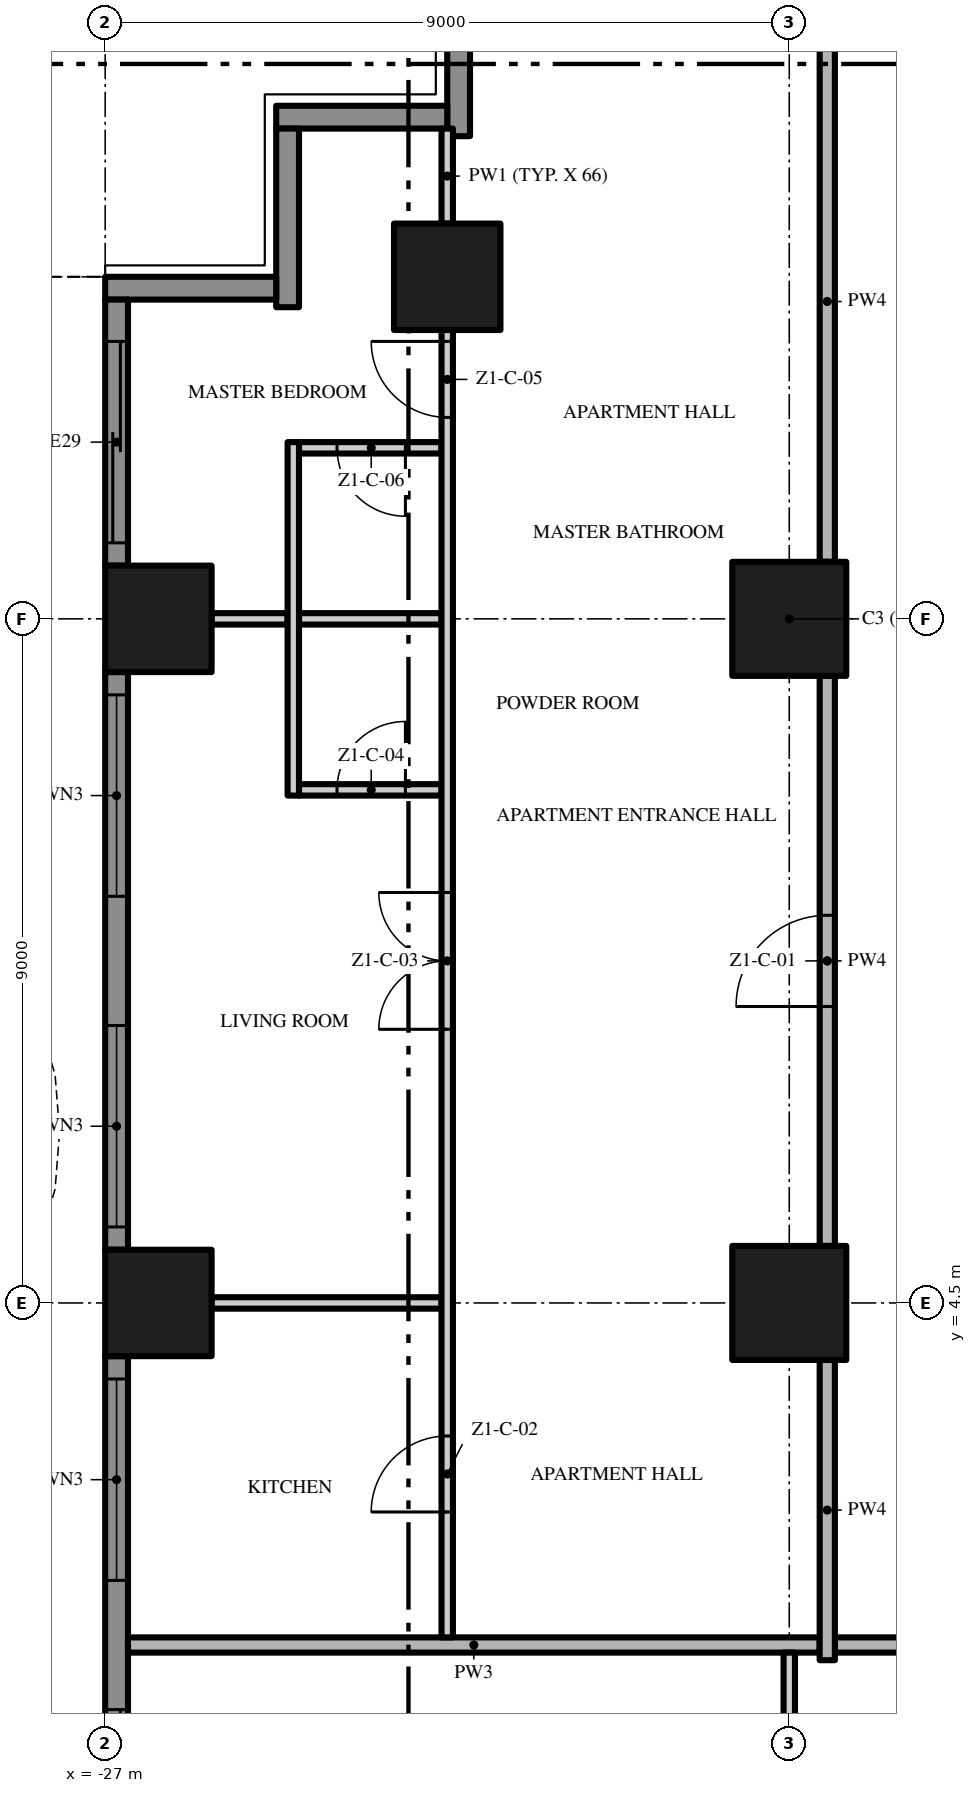
"""IFC4 building model, lengths in metres.
Left out: names, types, materials, properties, quantities, classifications, styles, units other than length and angle.
Written with IfcOpenShell. Run it as: python <this file> out.ifc"""

import sys

from ifc_helpers import new_model, si_unit, direction, frame, frame_2d, origin, origin_2d, place, context, subcontext, project, spatial, polyline, rectangle, outline, extrude, element, fill, save


model = new_model("IFC4")
c1 = context("Model", 3, precision=1e-05, world=origin(), true_north=direction((0.0, 1.0)))
c2 = subcontext(c1, "Body", "Model", "MODEL_VIEW")
j1 = project(units=[si_unit("LENGTHUNIT", "METRE"), si_unit("PLANEANGLEUNIT", "RADIAN")], contexts=[c1])
p1 = place(None, origin())
s1 = spatial("IfcSite", under=j1, at=p1, CompositionType="ELEMENT")
p2 = place(p1, origin())
s2 = spatial("IfcBuilding", under=s1, at=p2, CompositionType="ELEMENT")
p3 = place(p2, frame((0.0, 0.0, 45.4)))
s3 = spatial("IfcBuildingStorey", under=s2, at=p3, CompositionType="ELEMENT", Elevation=45.4)
for number, where, z_axis, x_axis in (
    (1, (-18.0, 13.5, 0.0), (0.0, 0.0, 1.0), (1.0, 0.0, 0.0)),
    (2, (-18.0, 4.5, 0.0), (0.0, 0.0, 1.0), (1.0, 0.0, 0.0)),
):
    element("IfcColumn", number, at=place(p3, frame(where, z_axis=z_axis, x_axis=x_axis)), inside=s3, PredefinedType="COLUMN", context=c2, shape_type="SweptSolid", body=[
        extrude(rectangle(XDim=1.5, YDim=1.5, at=origin_2d()), origin(), (0.0, 0.0, 1.0), 3.5),
    ])
for number, where, z_axis, x_axis in (
    (3, (-26.3, 13.5, 0.0), (0.0, 0.0, 1.0), (1.0, 0.0, 0.0)),
    (4, (-22.5, 18.0, 0.0), (0.0, 0.0, 1.0), (1.0, 0.0, 0.0)),
    (5, (-26.3, 4.5, 0.0), (0.0, 0.0, 1.0), (1.0, 0.0, 0.0)),
):
    element("IfcColumn", number, at=place(p3, frame(where, z_axis=z_axis, x_axis=x_axis)), inside=s3, PredefinedType="COLUMN", context=c2, shape_type="SweptSolid", body=[
        extrude(rectangle(XDim=1.4, YDim=1.4, at=origin_2d()), origin(), (0.0, 0.0, 1.0), 3.5),
    ])
p4 = place(p3, frame((-22.35, 19.85, 0.0), z_axis=(0.0, 0.0, 1.0), x_axis=(0.0, 1.0, 0.0)))
e6 = element("IfcWall", 6, at=p4, inside=s3, PredefinedType="SOLIDWALL", context=c2, shape_type="SweptSolid", body=[
    extrude(rectangle(XDim=2.35, YDim=0.3, at=frame_2d((1.175, 0.0))), origin(), (0.0, 0.0, 1.0), 3.5),
])
p5 = place(p3, frame((-24.75, 20.1, 0.0), z_axis=(0.0, 0.0, 1.0), x_axis=(1.0, 0.0, 0.0)))
e7 = element("IfcWall", 7, at=p5, inside=s3, PredefinedType="SOLIDWALL", context=c2, shape_type="SweptSolid", body=[
    extrude(rectangle(XDim=2.25, YDim=0.3, at=frame_2d((1.125, 0.0))), origin(), (0.0, 0.0, 1.0), 3.5),
])
p6 = place(p3, frame((-24.6, 17.6, 0.0), z_axis=(0.0, 0.0, 1.0), x_axis=(0.0, 1.0, 0.0)))
e8 = element("IfcWall", 8, at=p6, inside=s3, PredefinedType="SOLIDWALL", context=c2, shape_type="SweptSolid", body=[
    extrude(rectangle(XDim=2.35, YDim=0.3, at=frame_2d((1.175, 0.0))), origin(), (0.0, 0.0, 1.0), 3.5),
])
p7 = place(p3, frame((-27.0, 17.85, 0.0), z_axis=(0.0, 0.0, 1.0), x_axis=(1.0, 0.0, 0.0)))
e9 = element("IfcWall", 9, at=p7, inside=s3, PredefinedType="SOLIDWALL", context=c2, shape_type="SweptSolid", body=[
    extrude(rectangle(XDim=2.25, YDim=0.3, at=frame_2d((1.125, 0.0))), origin(), (0.0, 0.0, 1.0), 3.5),
])
p8 = place(p3, frame((-26.85, 14.2, 0.0), z_axis=(0.0, 0.0, 1.0), x_axis=(0.0, 1.0, 0.0)))
e10 = element("IfcWall", 10, at=p8, inside=s3, PredefinedType="SOLIDWALL", context=c2, shape_type="SweptSolid", body=[
    extrude(rectangle(XDim=3.5, YDim=0.3, at=frame_2d((1.75, 0.0))), origin(), (0.0, 0.0, 1.0), 3.5),
])
p9 = place(p8, frame((0.3, 0.0, 0.0)))
e11 = element("IfcOpeningElement", 11, at=p9, cuts=e10, PredefinedType="OPENING", context=c2, shape_type="SweptSolid", body=[
    extrude(rectangle(XDim=2.65, YDim=2.4, at=frame_2d((1.325, 1.2))), frame((0.0, 0.16, 0.0), z_axis=(0.0, -1.0, 0.0), x_axis=(1.0, 0.0, 0.0)), (0.0, 0.0, 1.0), 0.32),
])
p10 = place(p3, frame((-26.85, 5.2, 0.0), z_axis=(0.0, 0.0, 1.0), x_axis=(0.0, 1.0, 0.0)))
e12 = element("IfcWall", 12, at=p10, inside=s3, PredefinedType="SOLIDWALL", context=c2, shape_type="SweptSolid", body=[
    extrude(rectangle(XDim=7.6, YDim=0.3, at=frame_2d((3.8, 0.0))), origin(), (0.0, 0.0, 1.0), 3.5),
])
p11 = place(p10, frame((4.65, 0.0, 0.45)))
e13 = element("IfcOpeningElement", 13, at=p11, cuts=e12, PredefinedType="OPENING", context=c2, shape_type="SweptSolid", body=[
    extrude(rectangle(XDim=2.65, YDim=2.65, at=frame_2d((1.325, 1.325))), frame((0.0, 0.16, 0.0), z_axis=(0.0, -1.0, 0.0), x_axis=(1.0, 0.0, 0.0)), (0.0, 0.0, 1.0), 0.32),
])
p12 = place(p10, frame((0.3, 0.0, 0.45)))
e14 = element("IfcOpeningElement", 14, at=p12, cuts=e12, PredefinedType="OPENING", context=c2, shape_type="SweptSolid", body=[
    extrude(rectangle(XDim=2.65, YDim=2.65, at=frame_2d((1.325, 1.325))), frame((0.0, 0.16, 0.0), z_axis=(0.0, -1.0, 0.0), x_axis=(1.0, 0.0, 0.0)), (0.0, 0.0, 1.0), 0.32),
])
p13 = place(p3, frame((-26.85, -3.8, 0.0), z_axis=(0.0, 0.0, 1.0), x_axis=(0.0, 1.0, 0.0)))
e15 = element("IfcWall", 15, at=p13, inside=s3, PredefinedType="SOLIDWALL", context=c2, shape_type="SweptSolid", body=[
    extrude(rectangle(XDim=7.6, YDim=0.3, at=frame_2d((3.8, 0.0))), origin(), (0.0, 0.0, 1.0), 3.5),
])
p14 = place(p13, frame((4.65, 0.0, 0.45)))
e16 = element("IfcOpeningElement", 16, at=p14, cuts=e15, PredefinedType="OPENING", context=c2, shape_type="SweptSolid", body=[
    extrude(rectangle(XDim=2.65, YDim=2.65, at=frame_2d((1.325, 1.325))), frame((0.0, 0.16, 0.0), z_axis=(0.0, -1.0, 0.0), x_axis=(1.0, 0.0, 0.0)), (0.0, 0.0, 1.0), 0.32),
])
p15 = place(p13, frame((0.3, 0.0, 0.0)))
e17 = element("IfcOpeningElement", 17, at=p15, cuts=e15, PredefinedType="OPENING", context=c2, shape_type="SweptSolid", body=[
    extrude(rectangle(XDim=2.65, YDim=2.4, at=frame_2d((1.325, 1.2))), frame((0.0, 0.16, 0.0), z_axis=(0.0, -1.0, 0.0), x_axis=(1.0, 0.0, 0.0)), (0.0, 0.0, 1.0), 0.32),
])
p16 = place(p3, origin())
e18 = element("IfcWall", 18, at=p16, inside=s3, PredefinedType="USERDEFINED", context=c2, shape_type="SweptSolid", body=[
    extrude(outline(polyline([(-28.8, 18.0), (-29.505, 16.5), (-29.941, 15.0), (-30.0, 14.25), (-29.941, 13.5), (-29.505, 12.0), (-28.8, 10.5), (-28.095, 9.0), (-27.659, 7.5), (-27.6, 6.75), (-27.659, 6.0), (-28.095, 4.5), (-28.8, 3.0), (-29.505, 1.5), (-29.941, 0.0), (-30.0, -0.75), (-29.941, -1.5), (-29.505, -3.0), (-28.8, -4.5), (-28.095, -6.0), (-27.659, -7.5), (-27.6, -8.25), (-27.659, -9.0), (-28.095, -10.5), (-28.8, -12.0), (-29.505, -13.5), (-29.941, -15.0), (-30.0, -15.75), (-29.941, -16.5), (-29.505, -18.0), (-29.265, -17.93), (-29.694, -16.455), (-29.749, -15.75), (-29.694, -15.045), (-29.271, -13.589), (-28.574, -12.106), (-27.86, -10.589), (-27.411, -9.045), (-27.349, -8.25), (-27.411, -7.455), (-27.86, -5.911), (-28.574, -4.394), (-29.271, -2.911), (-29.694, -1.455), (-29.749, -0.75), (-29.694, -0.045), (-29.271, 1.411), (-28.574, 2.894), (-27.86, 4.411), (-27.411, 5.955), (-27.349, 6.75), (-27.411, 7.545), (-27.86, 9.089), (-28.574, 10.606), (-29.271, 12.089), (-29.694, 13.545), (-29.749, 14.25), (-29.694, 14.955), (-29.271, 16.411), (-28.574, 17.894), (-28.8, 18.0)])), origin(), (0.0, 0.0, 1.0), 0.9),
])
p17 = place(p3, frame((-17.4, 0.0, 0.0), z_axis=(0.0, 0.0, 1.0), x_axis=(1.0, 0.0, 0.0)))
e19 = element("IfcWall", 19, at=p17, inside=s3, PredefinedType="PARTITIONING", context=c2, shape_type="SweptSolid", body=[
    extrude(rectangle(XDim=12.8, YDim=0.2, at=frame_2d((6.4, 0.0))), origin(), (0.0, 0.0, 1.0), 3.5),
])
p18 = place(p3, frame((-26.7, 0.0, 0.0), z_axis=(0.0, 0.0, 1.0), x_axis=(1.0, 0.0, 0.0)))
e20 = element("IfcWall", 20, at=p18, inside=s3, PredefinedType="PARTITIONING", context=c2, shape_type="SweptSolid", body=[
    extrude(rectangle(XDim=9.1, YDim=0.2, at=frame_2d((4.55, 0.0))), origin(), (0.0, 0.0, 1.0), 3.5),
])
p19 = place(p3, frame((-25.6, 4.5, 0.0), z_axis=(0.0, 0.0, 1.0), x_axis=(1.0, 0.0, 0.0)))
e21 = element("IfcWall", 21, at=p19, inside=s3, PredefinedType="PARTITIONING", context=c2, shape_type="SweptSolid", body=[
    extrude(rectangle(XDim=3.025, YDim=0.15, at=frame_2d((1.512, 0.0))), origin(), (0.0, 0.0, 1.0), 3.5),
])
p20 = place(p3, frame((-24.45, 11.25, 0.0), z_axis=(0.0, 0.0, 1.0), x_axis=(1.0, 0.0, 0.0)))
e22 = element("IfcWall", 22, at=p20, inside=s3, PredefinedType="PARTITIONING", context=c2, shape_type="SweptSolid", body=[
    extrude(rectangle(XDim=1.875, YDim=0.15, at=frame_2d((0.938, 0.0))), origin(), (0.0, 0.0, 1.0), 3.5),
])
p21 = place(p20, frame((0.5, 0.0, 0.0)))
e23 = element("IfcOpeningElement", 23, at=p21, cuts=e22, PredefinedType="OPENING", context=c2, shape_type="SweptSolid", body=[
    extrude(rectangle(XDim=0.9, YDim=2.1, at=frame_2d((0.45, 1.05))), frame((0.0, 0.085, 0.0), z_axis=(0.0, -1.0, 0.0), x_axis=(1.0, 0.0, 0.0)), (0.0, 0.0, 1.0), 0.17),
])
p22 = place(p3, frame((-25.6, 13.5, 0.0), z_axis=(0.0, 0.0, 1.0), x_axis=(1.0, 0.0, 0.0)))
e24 = element("IfcWall", 24, at=p22, inside=s3, PredefinedType="PARTITIONING", context=c2, shape_type="SweptSolid", body=[
    extrude(rectangle(XDim=1.0, YDim=0.15, at=frame_2d((0.5, 0.0))), origin(), (0.0, 0.0, 1.0), 3.5),
])
p23 = place(p3, frame((-24.45, 13.5, 0.0), z_axis=(0.0, 0.0, 1.0), x_axis=(1.0, 0.0, 0.0)))
e25 = element("IfcWall", 25, at=p23, inside=s3, PredefinedType="PARTITIONING", context=c2, shape_type="SweptSolid", body=[
    extrude(rectangle(XDim=1.875, YDim=0.15, at=frame_2d((0.938, 0.0))), origin(), (0.0, 0.0, 1.0), 3.5),
])
p24 = place(p3, frame((-22.575, 15.75, 0.0), z_axis=(0.0, 0.0, 1.0), x_axis=(-1.0, 0.0, 0.0)))
e26 = element("IfcWall", 26, at=p24, inside=s3, PredefinedType="PARTITIONING", context=c2, shape_type="SweptSolid", body=[
    extrude(rectangle(XDim=1.875, YDim=0.15, at=frame_2d((0.938, 0.0))), origin(), (0.0, 0.0, 1.0), 3.5),
])
p25 = place(p24, frame((0.475, 0.0, 0.0)))
e27 = element("IfcOpeningElement", 27, at=p25, cuts=e26, PredefinedType="OPENING", context=c2, shape_type="SweptSolid", body=[
    extrude(rectangle(XDim=0.9, YDim=2.1, at=frame_2d((0.45, 1.05))), frame((0.0, 0.085, 0.0), z_axis=(0.0, -1.0, 0.0), x_axis=(1.0, 0.0, 0.0)), (0.0, 0.0, 1.0), 0.17),
])
p26 = place(p3, frame((-24.525, 11.175, 0.0), z_axis=(0.0, 0.0, 1.0), x_axis=(0.0, 1.0, 0.0)))
e28 = element("IfcWall", 28, at=p26, inside=s3, PredefinedType="PARTITIONING", context=c2, shape_type="SweptSolid", body=[
    extrude(rectangle(XDim=4.65, YDim=0.15, at=frame_2d((2.325, 0.0))), origin(), (0.0, 0.0, 1.0), 3.5),
])
p27 = place(p3, frame((-22.5, 0.1, 0.0), z_axis=(0.0, 0.0, 1.0), x_axis=(0.0, 1.0, 0.0)))
e29 = element("IfcWall", 29, at=p27, inside=s3, PredefinedType="PARTITIONING", context=c2, shape_type="SweptSolid", body=[
    extrude(rectangle(XDim=17.2, YDim=0.15, at=frame_2d((8.6, 0.0))), origin(), (0.0, 0.0, 1.0), 3.5),
])
p28 = place(p27, frame((1.65, 0.0, 0.0)))
e30 = element("IfcOpeningElement", 30, at=p28, cuts=e29, PredefinedType="OPENING", context=c2, shape_type="SweptSolid", body=[
    extrude(rectangle(XDim=1.0, YDim=2.4, at=frame_2d((0.5, 1.2))), frame((0.0, 0.085, 0.0), z_axis=(0.0, -1.0, 0.0), x_axis=(1.0, 0.0, 0.0)), (0.0, 0.0, 1.0), 0.17),
])
p29 = place(p27, frame((8.0, 0.0, 0.0)))
e31 = element("IfcOpeningElement", 31, at=p29, cuts=e29, PredefinedType="OPENING", context=c2, shape_type="SweptSolid", body=[
    extrude(rectangle(XDim=1.8, YDim=2.4, at=frame_2d((0.9, 1.2))), frame((0.0, 0.085, 0.0), z_axis=(0.0, -1.0, 0.0), x_axis=(1.0, 0.0, 0.0)), (0.0, 0.0, 1.0), 0.17),
])
p30 = place(p27, frame((16.05, 0.0, 0.0)))
e32 = element("IfcOpeningElement", 32, at=p30, cuts=e29, PredefinedType="OPENING", context=c2, shape_type="SweptSolid", body=[
    extrude(rectangle(XDim=1.0, YDim=2.4, at=frame_2d((0.5, 1.2))), frame((0.0, 0.085, 0.0), z_axis=(0.0, -1.0, 0.0), x_axis=(1.0, 0.0, 0.0)), (0.0, 0.0, 1.0), 0.17),
])
p31 = place(p3, frame((-22.5, 18.7, 0.0), z_axis=(0.0, 0.0, 1.0), x_axis=(0.0, 1.0, 0.0)))
e33 = element("IfcWall", 33, at=p31, inside=s3, PredefinedType="PARTITIONING", context=c2, shape_type="SweptSolid", body=[
    extrude(rectangle(XDim=1.25, YDim=0.15, at=frame_2d((0.625, 0.0))), origin(), (0.0, 0.0, 1.0), 3.5),
])
p32 = place(p3, frame((-18.0, -3.75, 0.0), z_axis=(0.0, 0.0, 1.0), x_axis=(0.0, 1.0, 0.0)))
e34 = element("IfcWall", 34, at=p32, inside=s3, PredefinedType="PARTITIONING", context=c2, shape_type="SweptSolid", body=[
    extrude(rectangle(XDim=3.65, YDim=0.15, at=frame_2d((1.825, 0.0))), origin(), (0.0, 0.0, 1.0), 3.5),
])
p33 = place(p32, frame((1.0, 0.0, 0.0)))
e35 = element("IfcOpeningElement", 35, at=p33, cuts=e34, PredefinedType="OPENING", context=c2, shape_type="SweptSolid", body=[
    extrude(rectangle(XDim=1.0, YDim=2.4, at=frame_2d((0.5, 1.2))), frame((0.0, 0.085, 0.0), z_axis=(0.0, -1.0, 0.0), x_axis=(1.0, 0.0, 0.0)), (0.0, 0.0, 1.0), 0.17),
])
p34 = place(p3, frame((-17.5, -0.2, 0.0), z_axis=(0.0, 0.0, 1.0), x_axis=(0.0, 1.0, 0.0)))
e36 = element("IfcWall", 36, at=p34, inside=s3, PredefinedType="PARTITIONING", context=c2, shape_type="SweptSolid", body=[
    extrude(rectangle(XDim=3.95, YDim=0.2, at=frame_2d((1.975, 0.0))), origin(), (0.0, 0.0, 1.0), 3.5),
])
p35 = place(p3, frame((-17.5, 5.25, 0.0), z_axis=(0.0, 0.0, 1.0), x_axis=(0.0, 1.0, 0.0)))
e37 = element("IfcWall", 37, at=p35, inside=s3, PredefinedType="PARTITIONING", context=c2, shape_type="SweptSolid", body=[
    extrude(rectangle(XDim=7.5, YDim=0.2, at=frame_2d((3.75, 0.0))), origin(), (0.0, 0.0, 1.0), 3.5),
])
p36 = place(p35, frame((3.15, 0.0, 0.0)))
e38 = element("IfcOpeningElement", 38, at=p36, cuts=e37, PredefinedType="OPENING", context=c2, shape_type="SweptSolid", body=[
    extrude(rectangle(XDim=1.2, YDim=2.4, at=frame_2d((0.6, 1.2))), frame((0.0, 0.11, 0.0), z_axis=(0.0, -1.0, 0.0), x_axis=(1.0, 0.0, 0.0)), (0.0, 0.0, 1.0), 0.22),
])
p37 = place(p3, frame((-17.5, 14.25, 0.0), z_axis=(0.0, 0.0, 1.0), x_axis=(0.0, 1.0, 0.0)))
e39 = element("IfcWall", 39, at=p37, inside=s3, PredefinedType="PARTITIONING", context=c2, shape_type="SweptSolid", body=[
    extrude(rectangle(XDim=6.85, YDim=0.2, at=frame_2d((3.425, 0.0))), origin(), (0.0, 0.0, 1.0), 3.5),
])
p38 = place(p9, origin())
e40 = element("IfcDoor", 40, at=p38, inside=s3, OperationType="SINGLE_SWING_LEFT", PredefinedType="DOOR", context=c2, shape_type="SweptSolid", body=[
    extrude(rectangle(XDim=2.65, YDim=2.4, at=frame_2d((1.325, 1.2))), frame((0.0, 0.025, 0.0), z_axis=(0.0, -1.0, 0.0), x_axis=(1.0, 0.0, 0.0)), (0.0, 0.0, 1.0), 0.05),
])
fill(e11, e40)
p39 = place(p11, origin())
e41 = element("IfcWindow", 41, at=p39, inside=s3, PartitioningType="SINGLE_PANEL", PredefinedType="WINDOW", context=c2, shape_type="SweptSolid", body=[
    extrude(rectangle(XDim=2.65, YDim=2.65, at=frame_2d((1.325, 1.325))), frame((0.0, 0.03, 0.0), z_axis=(0.0, -1.0, 0.0), x_axis=(1.0, 0.0, 0.0)), (0.0, 0.0, 1.0), 0.06),
])
fill(e13, e41)
p40 = place(p12, origin())
e42 = element("IfcWindow", 42, at=p40, inside=s3, PartitioningType="SINGLE_PANEL", PredefinedType="WINDOW", context=c2, shape_type="SweptSolid", body=[
    extrude(rectangle(XDim=2.65, YDim=2.65, at=frame_2d((1.325, 1.325))), frame((0.0, 0.03, 0.0), z_axis=(0.0, -1.0, 0.0), x_axis=(1.0, 0.0, 0.0)), (0.0, 0.0, 1.0), 0.06),
])
fill(e14, e42)
p41 = place(p14, origin())
e43 = element("IfcWindow", 43, at=p41, inside=s3, PartitioningType="SINGLE_PANEL", PredefinedType="WINDOW", context=c2, shape_type="SweptSolid", body=[
    extrude(rectangle(XDim=2.65, YDim=2.65, at=frame_2d((1.325, 1.325))), frame((0.0, 0.03, 0.0), z_axis=(0.0, -1.0, 0.0), x_axis=(1.0, 0.0, 0.0)), (0.0, 0.0, 1.0), 0.06),
])
fill(e16, e43)
p42 = place(p15, origin())
e44 = element("IfcDoor", 44, at=p42, inside=s3, OperationType="SINGLE_SWING_LEFT", PredefinedType="DOOR", context=c2, shape_type="SweptSolid", body=[
    extrude(rectangle(XDim=2.65, YDim=2.4, at=frame_2d((1.325, 1.2))), frame((0.0, 0.025, 0.0), z_axis=(0.0, -1.0, 0.0), x_axis=(1.0, 0.0, 0.0)), (0.0, 0.0, 1.0), 0.05),
])
fill(e17, e44)
p43 = place(p36, origin())
e45 = element("IfcDoor", 45, at=p43, inside=s3, OperationType="SINGLE_SWING_LEFT", PredefinedType="DOOR", context=c2, shape_type="SweptSolid", body=[
    extrude(rectangle(XDim=1.2, YDim=2.4, at=frame_2d((0.6, 1.2))), frame((0.0, 0.025, 0.0), z_axis=(0.0, -1.0, 0.0), x_axis=(1.0, 0.0, 0.0)), (0.0, 0.0, 1.0), 0.05),
])
fill(e38, e45)
p44 = place(p28, origin())
e46 = element("IfcDoor", 46, at=p44, inside=s3, OperationType="SINGLE_SWING_LEFT", PredefinedType="DOOR", context=c2, shape_type="SweptSolid", body=[
    extrude(rectangle(XDim=1.0, YDim=2.4, at=frame_2d((0.5, 1.2))), frame((0.0, 0.025, 0.0), z_axis=(0.0, -1.0, 0.0), x_axis=(1.0, 0.0, 0.0)), (0.0, 0.0, 1.0), 0.05),
])
fill(e30, e46)
p45 = place(p29, origin())
e47 = element("IfcDoor", 47, at=p45, inside=s3, OperationType="DOUBLE_DOOR_SINGLE_SWING", PredefinedType="DOOR", context=c2, shape_type="SweptSolid", body=[
    extrude(rectangle(XDim=1.8, YDim=2.4, at=frame_2d((0.9, 1.2))), frame((0.0, 0.025, 0.0), z_axis=(0.0, -1.0, 0.0), x_axis=(1.0, 0.0, 0.0)), (0.0, 0.0, 1.0), 0.05),
])
fill(e31, e47)
p46 = place(p21, origin())
e48 = element("IfcDoor", 48, at=p46, inside=s3, OperationType="SINGLE_SWING_RIGHT", PredefinedType="DOOR", context=c2, shape_type="SweptSolid", body=[
    extrude(rectangle(XDim=0.9, YDim=2.1, at=frame_2d((0.45, 1.05))), frame((0.0, 0.025, 0.0), z_axis=(0.0, -1.0, 0.0), x_axis=(1.0, 0.0, 0.0)), (0.0, 0.0, 1.0), 0.05),
])
fill(e23, e48)
p47 = place(p30, origin())
e49 = element("IfcDoor", 49, at=p47, inside=s3, OperationType="SINGLE_SWING_RIGHT", PredefinedType="DOOR", context=c2, shape_type="SweptSolid", body=[
    extrude(rectangle(XDim=1.0, YDim=2.4, at=frame_2d((0.5, 1.2))), frame((0.0, 0.025, 0.0), z_axis=(0.0, -1.0, 0.0), x_axis=(1.0, 0.0, 0.0)), (0.0, 0.0, 1.0), 0.05),
])
fill(e32, e49)
p48 = place(p25, origin())
e50 = element("IfcDoor", 50, at=p48, inside=s3, OperationType="SINGLE_SWING_LEFT", PredefinedType="DOOR", context=c2, shape_type="SweptSolid", body=[
    extrude(rectangle(XDim=0.9, YDim=2.1, at=frame_2d((0.45, 1.05))), frame((0.0, 0.025, 0.0), z_axis=(0.0, -1.0, 0.0), x_axis=(1.0, 0.0, 0.0)), (0.0, 0.0, 1.0), 0.05),
])
fill(e27, e50)
save(model, sys.argv[1])
